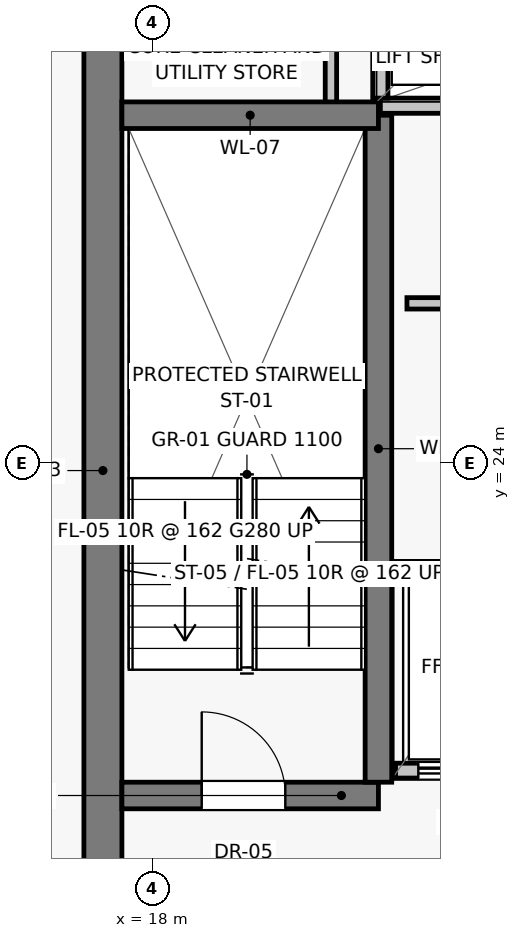
"""IFC4 building model, lengths in metres.
Left out: names, types, materials, properties, quantities, classifications, styles, units other than length and angle.
Written with IfcOpenShell. Run it as: python <this file> out.ifc"""

import sys

from ifc_helpers import new_model, si_unit, direction, frame, frame_2d, origin, place, context, subcontext, project, spatial, rectangle, extrude, source, transform, mapped, element, fill, save


model = new_model("IFC4")
c1 = context("Model", 3, precision=1e-05, world=origin(), true_north=direction((0.0, 1.0)))
c2 = subcontext(c1, "Body", "Model", "MODEL_VIEW")
j1 = project(units=[si_unit("LENGTHUNIT", "METRE"), si_unit("PLANEANGLEUNIT", "RADIAN")], contexts=[c1])
p1 = place(None, origin())
s1 = spatial("IfcSite", under=j1, at=p1, CompositionType="ELEMENT")
p2 = place(p1, origin())
s2 = spatial("IfcBuilding", under=s1, at=p2, CompositionType="ELEMENT")
p3 = place(p2, frame((0.0, 0.0, 233.3)))
s3 = spatial("IfcBuildingStorey", under=s2, at=p3, CompositionType="ELEMENT", Elevation=233.3)
p4 = place(p3, frame((17.35, 16.8, 0.0), z_axis=(0.0, 0.0, 1.0), x_axis=(0.0, 1.0, 0.0)))
e1 = element("IfcWall", 1, at=p4, inside=s3, PredefinedType="SHEAR", context=c2, shape_type="SweptSolid", body=[
    extrude(rectangle(XDim=14.2, YDim=0.5, at=frame_2d((7.1, 0.0))), origin(), (0.0, 0.0, 1.0), 3.015),
])
p5 = place(p3, frame((20.35, 28.65, 0.0), z_axis=(0.0, 0.0, 1.0), x_axis=(0.0, 1.0, 0.0)))
e2 = element("IfcWall", 2, at=p5, inside=s3, PredefinedType="PARTITIONING", context=c2, shape_type="SweptSolid", body=[
    extrude(rectangle(XDim=2.2, YDim=0.15, at=frame_2d((1.1, 0.0))), origin(), (0.0, 0.0, 1.0), 3.015),
])
p6 = place(p3, frame((17.6, 19.625, 0.0), z_axis=(0.0, 0.0, 1.0), x_axis=(1.0, 0.0, 0.0)))
e3 = element("IfcWall", 3, at=p6, inside=s3, PredefinedType="SHEAR", context=c2, shape_type="SweptSolid", body=[
    extrude(rectangle(XDim=3.375, YDim=0.35, at=frame_2d((1.688, 0.0))), origin(), (0.0, 0.0, 1.0), 3.015),
])
p7 = place(p6, frame((1.05, 0.0, 0.0)))
e4 = element("IfcOpeningElement", 4, at=p7, cuts=e3, PredefinedType="OPENING", context=c2, shape_type="SweptSolid", body=[
    extrude(rectangle(XDim=1.1, YDim=2.03, at=frame_2d((0.55, 1.015))), frame((0.0, 0.185, 0.0), z_axis=(0.0, -1.0, 0.0), x_axis=(1.0, 0.0, 0.0)), (0.0, 0.0, 1.0), 0.37),
])
p8 = place(p3, frame((21.2, 19.95, 0.0), z_axis=(0.0, 0.0, 1.0), x_axis=(1.0, 0.0, 0.0)))
e5 = element("IfcWall", 5, at=p8, inside=s3, PredefinedType="SOLIDWALL", context=c2, shape_type="SweptSolid", body=[
    extrude(rectangle(XDim=1.85, YDim=0.2, at=frame_2d((0.925, 0.0))), origin(), (0.0, 0.0, 1.0), 3.015),
])
p9 = place(p8, frame((0.3, 0.0, 0.0)))
e6 = element("IfcOpeningElement", 6, at=p9, cuts=e5, PredefinedType="OPENING", context=c2, shape_type="SweptSolid", body=[
    extrude(rectangle(XDim=1.3, YDim=2.25, at=frame_2d((0.65, 1.125))), frame((0.0, 0.11, 0.0), z_axis=(0.0, -1.0, 0.0), x_axis=(1.0, 0.0, 0.0)), (0.0, 0.0, 1.0), 0.22),
])
p10 = place(p3, frame((20.975, 19.8, 0.0), z_axis=(0.0, 0.0, 1.0), x_axis=(0.0, 1.0, 0.0)))
e7 = element("IfcWall", 7, at=p10, inside=s3, PredefinedType="SHEAR", context=c2, shape_type="SweptSolid", body=[
    extrude(rectangle(XDim=8.775, YDim=0.35, at=frame_2d((4.387, 0.0))), origin(), (0.0, 0.0, 1.0), 3.015),
])
p11 = place(p3, frame((17.6, 28.575, 0.0), z_axis=(0.0, 0.0, 1.0), x_axis=(1.0, 0.0, 0.0)))
e8 = element("IfcWall", 8, at=p11, inside=s3, PredefinedType="SHEAR", context=c2, shape_type="SweptSolid", body=[
    extrude(rectangle(XDim=3.375, YDim=0.35, at=frame_2d((1.688, 0.0))), origin(), (0.0, 0.0, 1.0), 3.015),
])
p12 = place(p3, frame((21.2, 22.6, 0.0), z_axis=(0.0, 0.0, 1.0), x_axis=(1.0, 0.0, 0.0)))
e9 = element("IfcWall", 9, at=p12, inside=s3, PredefinedType="SOLIDWALL", context=c2, shape_type="SweptSolid", body=[
    extrude(rectangle(XDim=1.85, YDim=0.2, at=frame_2d((0.925, 0.0))), origin(), (0.0, 0.0, 1.0), 3.015),
])
p13 = place(p3, frame((21.0, 28.7, 0.0), z_axis=(0.0, 0.0, 1.0), x_axis=(1.0, 0.0, 0.0)))
e10 = element("IfcWall", 10, at=p13, inside=s3, PredefinedType="SOLIDWALL", context=c2, shape_type="SweptSolid", body=[
    extrude(rectangle(XDim=6.0, YDim=0.2, at=frame_2d((3.0, 0.0))), origin(), (0.0, 0.0, 1.0), 3.015),
])
p14 = place(p3, frame((21.0, 28.8, 0.0), z_axis=(0.0, 0.0, 1.0), x_axis=(0.0, 1.0, 0.0)))
e11 = element("IfcWall", 11, at=p14, inside=s3, PredefinedType="SOLIDWALL", context=c2, shape_type="SweptSolid", body=[
    extrude(rectangle(XDim=1.6, YDim=0.2, at=frame_2d((0.8, 0.0))), origin(), (0.0, 0.0, 1.0), 3.015),
])
p15 = place(p3, frame((21.35, 26.1, 0.0), z_axis=(0.0, 0.0, 1.0), x_axis=(1.0, 0.0, 0.0)))
e12 = element("IfcWall", 12, at=p15, inside=s3, PredefinedType="PARTITIONING", context=c2, shape_type="SweptSolid", body=[
    extrude(rectangle(XDim=5.3, YDim=0.15, at=frame_2d((2.65, 0.0))), origin(), (0.0, 0.0, 1.0), 3.015),
])
p16 = place(p15, frame((2.2, 0.0, 0.0)))
e13 = element("IfcOpeningElement", 13, at=p16, cuts=e12, PredefinedType="OPENING", context=c2, shape_type="SweptSolid", body=[
    extrude(rectangle(XDim=0.86, YDim=2.01, at=frame_2d((0.43, 1.005))), frame((0.0, 0.085, 0.0), z_axis=(0.0, -1.0, 0.0), x_axis=(1.0, 0.0, 0.0)), (0.0, 0.0, 1.0), 0.17),
])
m1 = source(origin(), c2, "Body", "SweptSolid", [
    extrude(rectangle(XDim=1.1, YDim=2.03, at=frame_2d((0.55, 1.015))), frame((0.0, 0.025, 0.0), z_axis=(0.0, -1.0, 0.0), x_axis=(1.0, 0.0, 0.0)), (0.0, 0.0, 1.0), 0.05),
])
p17 = place(p7, origin())
e14 = element("IfcDoor", 14, at=p17, inside=s3, OperationType="SINGLE_SWING_LEFT", PredefinedType="DOOR", context=c2, shape_type="MappedRepresentation", body=[
    mapped(m1, transform((0.0, 0.0, 0.0), scale=1.0)),
])
fill(e4, e14)
m2 = source(origin(), c2, "Body", "SweptSolid", [
    extrude(rectangle(XDim=1.3, YDim=2.25, at=frame_2d((0.65, 1.125))), frame((0.0, 0.025, 0.0), z_axis=(0.0, -1.0, 0.0), x_axis=(1.0, 0.0, 0.0)), (0.0, 0.0, 1.0), 0.05),
])
p18 = place(p9, origin())
e15 = element("IfcDoor", 15, at=p18, inside=s3, OperationType="SLIDING_TO_LEFT", PredefinedType="DOOR", context=c2, shape_type="MappedRepresentation", body=[
    mapped(m2, transform((0.0, 0.0, 0.0), scale=1.0)),
])
fill(e6, e15)
save(model, sys.argv[1])
